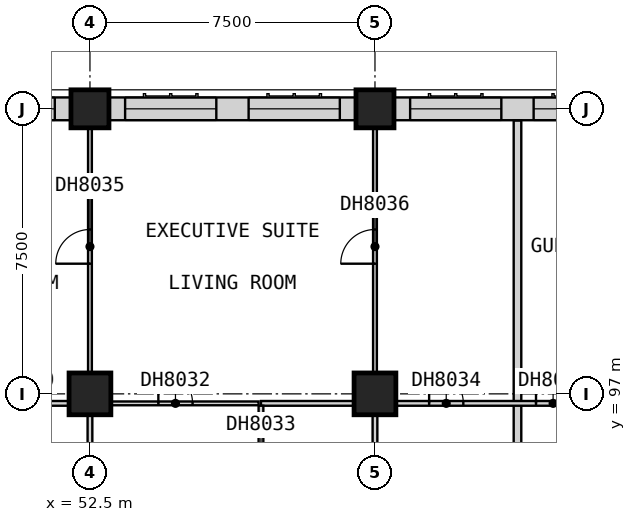
"""IFC4 building model, lengths in metres.
Left out: names, types, materials, properties, quantities, classifications, styles, units other than length and angle.
Written with IfcOpenShell. Run it as: python <this file> out.ifc"""

import sys

from ifc_helpers import new_model, si_unit, direction, frame, frame_2d, origin, origin_2d, place, context, subcontext, project, spatial, rectangle, extrude, element, fill, save


model = new_model("IFC4")
c1 = context("Model", 3, precision=1e-05, world=origin(), true_north=direction((0.0, 1.0)))
c2 = subcontext(c1, "Body", "Model", "MODEL_VIEW")
j1 = project(units=[si_unit("LENGTHUNIT", "METRE"), si_unit("PLANEANGLEUNIT", "RADIAN")], contexts=[c1])
p1 = place(None, origin())
s1 = spatial("IfcSite", under=j1, at=p1, CompositionType="ELEMENT")
p2 = place(p1, origin())
s2 = spatial("IfcBuilding", under=s1, at=p2, CompositionType="ELEMENT")
p3 = place(p2, frame((0.0, 0.0, 89.9)))
s3 = spatial("IfcBuildingStorey", under=s2, at=p3, CompositionType="ELEMENT", Elevation=89.9)
p4 = place(p3, frame((52.5, 97.0, 0.0), z_axis=(0.0, 0.0, 1.0), x_axis=(1.0, 0.0, 0.0)))
e1 = element("IfcColumn", 1, at=p4, inside=s3, PredefinedType="COLUMN", context=c2, shape_type="SweptSolid", body=[
    extrude(rectangle(XDim=1.1, YDim=1.1, at=origin_2d()), origin(), (0.0, 0.0, 1.0), 3.6),
])
p5 = place(p3, frame((52.5, 104.5, 0.0), z_axis=(0.0, 0.0, 1.0), x_axis=(1.0, 0.0, 0.0)))
e2 = element("IfcColumn", 2, at=p5, inside=s3, PredefinedType="COLUMN", context=c2, shape_type="SweptSolid", body=[
    extrude(rectangle(XDim=1.0, YDim=1.0, at=origin_2d()), origin(), (0.0, 0.0, 1.0), 3.6),
])
p6 = place(p3, frame((60.0, 97.0, 0.0), z_axis=(0.0, 0.0, 1.0), x_axis=(1.0, 0.0, 0.0)))
e3 = element("IfcColumn", 3, at=p6, inside=s3, PredefinedType="COLUMN", context=c2, shape_type="SweptSolid", body=[
    extrude(rectangle(XDim=1.1, YDim=1.1, at=origin_2d()), origin(), (0.0, 0.0, 1.0), 3.6),
])
p7 = place(p3, frame((60.0, 104.5, 0.0), z_axis=(0.0, 0.0, 1.0), x_axis=(1.0, 0.0, 0.0)))
e4 = element("IfcColumn", 4, at=p7, inside=s3, PredefinedType="COLUMN", context=c2, shape_type="SweptSolid", body=[
    extrude(rectangle(XDim=1.0, YDim=1.0, at=origin_2d()), origin(), (0.0, 0.0, 1.0), 3.6),
])
p8 = place(p3, frame((67.0, 104.5, 0.0), z_axis=(0.0, 0.0, 1.0), x_axis=(-1.0, 0.0, 0.0)))
e5 = element("IfcWall", 5, at=p8, inside=s3, PredefinedType="SOLIDWALL", context=c2, shape_type="SweptSolid", body=[
    extrude(rectangle(XDim=6.5, YDim=0.6, at=frame_2d((3.25, 0.0))), origin(), (0.0, 0.0, 1.0), 2.85),
])
p9 = place(p8, frame((3.675, 0.0, 0.8)))
e6 = element("IfcOpeningElement", 6, at=p9, cuts=e5, PredefinedType="OPENING", context=c2, shape_type="SweptSolid", body=[
    extrude(rectangle(XDim=2.4, YDim=1.8, at=frame_2d((1.2, 0.9))), frame((0.0, 0.31, 0.0), z_axis=(0.0, -1.0, 0.0), x_axis=(1.0, 0.0, 0.0)), (0.0, 0.0, 1.0), 0.62),
])
p10 = place(p8, frame((0.425, 0.0, 0.8)))
e7 = element("IfcOpeningElement", 7, at=p10, cuts=e5, PredefinedType="OPENING", context=c2, shape_type="SweptSolid", body=[
    extrude(rectangle(XDim=2.4, YDim=1.8, at=frame_2d((1.2, 0.9))), frame((0.0, 0.31, 0.0), z_axis=(0.0, -1.0, 0.0), x_axis=(1.0, 0.0, 0.0)), (0.0, 0.0, 1.0), 0.62),
])
p11 = place(p3, frame((59.5, 104.5, 0.0), z_axis=(0.0, 0.0, 1.0), x_axis=(-1.0, 0.0, 0.0)))
e8 = element("IfcWall", 8, at=p11, inside=s3, PredefinedType="SOLIDWALL", context=c2, shape_type="SweptSolid", body=[
    extrude(rectangle(XDim=6.5, YDim=0.6, at=frame_2d((3.25, 0.0))), origin(), (0.0, 0.0, 1.0), 2.85),
])
p12 = place(p11, frame((3.675, 0.0, 0.8)))
e9 = element("IfcOpeningElement", 9, at=p12, cuts=e8, PredefinedType="OPENING", context=c2, shape_type="SweptSolid", body=[
    extrude(rectangle(XDim=2.4, YDim=1.8, at=frame_2d((1.2, 0.9))), frame((0.0, 0.31, 0.0), z_axis=(0.0, -1.0, 0.0), x_axis=(1.0, 0.0, 0.0)), (0.0, 0.0, 1.0), 0.62),
])
p13 = place(p11, frame((0.425, 0.0, 0.8)))
e10 = element("IfcOpeningElement", 10, at=p13, cuts=e8, PredefinedType="OPENING", context=c2, shape_type="SweptSolid", body=[
    extrude(rectangle(XDim=2.4, YDim=1.8, at=frame_2d((1.2, 0.9))), frame((0.0, 0.31, 0.0), z_axis=(0.0, -1.0, 0.0), x_axis=(1.0, 0.0, 0.0)), (0.0, 0.0, 1.0), 0.62),
])
p14 = place(p3, frame((52.0, 104.5, 0.0), z_axis=(0.0, 0.0, 1.0), x_axis=(-1.0, 0.0, 0.0)))
e11 = element("IfcWall", 11, at=p14, inside=s3, PredefinedType="SOLIDWALL", context=c2, shape_type="SweptSolid", body=[
    extrude(rectangle(XDim=6.5, YDim=0.6, at=frame_2d((3.25, 0.0))), origin(), (0.0, 0.0, 1.0), 2.85),
])
p15 = place(p14, frame((3.675, 0.0, 0.8)))
e12 = element("IfcOpeningElement", 12, at=p15, cuts=e11, PredefinedType="OPENING", context=c2, shape_type="SweptSolid", body=[
    extrude(rectangle(XDim=2.4, YDim=1.8, at=frame_2d((1.2, 0.9))), frame((0.0, 0.31, 0.0), z_axis=(0.0, -1.0, 0.0), x_axis=(1.0, 0.0, 0.0)), (0.0, 0.0, 1.0), 0.62),
])
p16 = place(p14, frame((0.425, 0.0, 0.8)))
e13 = element("IfcOpeningElement", 13, at=p16, cuts=e11, PredefinedType="OPENING", context=c2, shape_type="SweptSolid", body=[
    extrude(rectangle(XDim=2.4, YDim=1.8, at=frame_2d((1.2, 0.9))), frame((0.0, 0.31, 0.0), z_axis=(0.0, -1.0, 0.0), x_axis=(1.0, 0.0, 0.0)), (0.0, 0.0, 1.0), 0.62),
])
p17 = place(p3, frame((63.75, 92.475, 0.0), z_axis=(0.0, 0.0, 1.0), x_axis=(0.0, 1.0, 0.0)))
e14 = element("IfcWall", 14, at=p17, inside=s3, PredefinedType="PARTITIONING", context=c2, shape_type="SweptSolid", body=[
    extrude(rectangle(XDim=11.715, YDim=0.2, at=frame_2d((5.857, 0.0))), origin(), (0.0, 0.0, 1.0), 3.35),
])
p18 = place(p3, frame((52.562, 96.75, 0.0), z_axis=(0.0, 0.0, 1.0), x_axis=(1.0, 0.0, 0.0)))
e15 = element("IfcWall", 15, at=p18, inside=s3, PredefinedType="PARTITIONING", context=c2, shape_type="SweptSolid", body=[
    extrude(rectangle(XDim=4.375, YDim=0.1, at=frame_2d((2.188, 0.0))), origin(), (0.0, 0.0, 1.0), 3.35),
])
p19 = place(p18, frame((1.738, 0.0, 0.0)))
e16 = element("IfcOpeningElement", 16, at=p19, cuts=e15, PredefinedType="OPENING", context=c2, shape_type="SweptSolid", body=[
    extrude(rectangle(XDim=0.9, YDim=2.1, at=frame_2d((0.45, 1.05))), frame((0.0, 0.06, 0.0), z_axis=(0.0, -1.0, 0.0), x_axis=(1.0, 0.0, 0.0)), (0.0, 0.0, 1.0), 0.12),
])
p20 = place(p3, frame((52.5, 96.812, 0.0), z_axis=(0.0, 0.0, 1.0), x_axis=(0.0, 1.0, 0.0)))
e17 = element("IfcWall", 17, at=p20, inside=s3, PredefinedType="PARTITIONING", context=c2, shape_type="SweptSolid", body=[
    extrude(rectangle(XDim=8.188, YDim=0.1, at=frame_2d((4.094, 0.0))), origin(), (0.0, 0.0, 1.0), 3.35),
])
p21 = place(p20, frame((3.613, 0.0, 0.0)))
e18 = element("IfcOpeningElement", 18, at=p21, cuts=e17, PredefinedType="OPENING", context=c2, shape_type="SweptSolid", body=[
    extrude(rectangle(XDim=0.9, YDim=2.1, at=frame_2d((0.45, 1.05))), frame((0.0, 0.06, 0.0), z_axis=(0.0, -1.0, 0.0), x_axis=(1.0, 0.0, 0.0)), (0.0, 0.0, 1.0), 0.12),
])
p22 = place(p3, frame((60.0, 96.812, 0.0), z_axis=(0.0, 0.0, 1.0), x_axis=(0.0, 1.0, 0.0)))
e19 = element("IfcWall", 19, at=p22, inside=s3, PredefinedType="PARTITIONING", context=c2, shape_type="SweptSolid", body=[
    extrude(rectangle(XDim=8.188, YDim=0.1, at=frame_2d((4.094, 0.0))), origin(), (0.0, 0.0, 1.0), 3.35),
])
p23 = place(p22, frame((3.613, 0.0, 0.0)))
e20 = element("IfcOpeningElement", 20, at=p23, cuts=e19, PredefinedType="OPENING", context=c2, shape_type="SweptSolid", body=[
    extrude(rectangle(XDim=0.9, YDim=2.1, at=frame_2d((0.45, 1.05))), frame((0.0, 0.06, 0.0), z_axis=(0.0, -1.0, 0.0), x_axis=(1.0, 0.0, 0.0)), (0.0, 0.0, 1.0), 0.12),
])
p24 = place(p3, frame((48.85, 96.75, 0.0), z_axis=(0.0, 0.0, 1.0), x_axis=(1.0, 0.0, 0.0)))
e21 = element("IfcWall", 21, at=p24, inside=s3, PredefinedType="PARTITIONING", context=c2, shape_type="SweptSolid", body=[
    extrude(rectangle(XDim=3.65, YDim=0.125, at=frame_2d((1.825, 0.0))), origin(), (0.0, 0.0, 1.0), 3.35),
])
p25 = place(p24, frame((1.325, 0.0, 0.0)))
e22 = element("IfcOpeningElement", 22, at=p25, cuts=e21, PredefinedType="OPENING", context=c2, shape_type="SweptSolid", body=[
    extrude(rectangle(XDim=0.9, YDim=2.1, at=frame_2d((0.45, 1.05))), frame((0.0, 0.073, 0.0), z_axis=(0.0, -1.0, 0.0), x_axis=(1.0, 0.0, 0.0)), (0.0, 0.0, 1.0), 0.145),
])
p26 = place(p3, frame((57.0, 96.75, 0.0), z_axis=(0.0, 0.0, 1.0), x_axis=(1.0, 0.0, 0.0)))
e23 = element("IfcWall", 23, at=p26, inside=s3, PredefinedType="PARTITIONING", context=c2, shape_type="SweptSolid", body=[
    extrude(rectangle(XDim=8.625, YDim=0.125, at=frame_2d((4.312, 0.0))), origin(), (0.0, 0.0, 1.0), 3.35),
])
p27 = place(p26, frame((4.425, 0.0, 0.0)))
e24 = element("IfcOpeningElement", 24, at=p27, cuts=e23, PredefinedType="OPENING", context=c2, shape_type="SweptSolid", body=[
    extrude(rectangle(XDim=0.9, YDim=2.1, at=frame_2d((0.45, 1.05))), frame((0.0, 0.073, 0.0), z_axis=(0.0, -1.0, 0.0), x_axis=(1.0, 0.0, 0.0)), (0.0, 0.0, 1.0), 0.145),
])
p28 = place(p26, frame((7.238, 0.0, 0.0)))
e25 = element("IfcOpeningElement", 25, at=p28, cuts=e23, PredefinedType="OPENING", context=c2, shape_type="SweptSolid", body=[
    extrude(rectangle(XDim=0.9, YDim=2.1, at=frame_2d((0.45, 1.05))), frame((0.0, 0.073, 0.0), z_axis=(0.0, -1.0, 0.0), x_axis=(1.0, 0.0, 0.0)), (0.0, 0.0, 1.0), 0.145),
])
p29 = place(p3, frame((52.5, 92.475, 0.0), z_axis=(0.0, 0.0, 1.0), x_axis=(0.0, 1.0, 0.0)))
e26 = element("IfcWall", 26, at=p29, inside=s3, PredefinedType="PARTITIONING", context=c2, shape_type="SweptSolid", body=[
    extrude(rectangle(XDim=4.212, YDim=0.125, at=frame_2d((2.106, 0.0))), origin(), (0.0, 0.0, 1.0), 3.35),
])
p30 = place(p3, frame((57.0, 92.475, 0.0), z_axis=(0.0, 0.0, 1.0), x_axis=(0.0, 1.0, 0.0)))
e27 = element("IfcWall", 27, at=p30, inside=s3, PredefinedType="PARTITIONING", context=c2, shape_type="SweptSolid", body=[
    extrude(rectangle(XDim=4.212, YDim=0.125, at=frame_2d((2.106, 0.0))), origin(), (0.0, 0.0, 1.0), 3.35),
])
p31 = place(p30, frame((1.65, 0.0, 0.0)))
e28 = element("IfcOpeningElement", 28, at=p31, cuts=e27, PredefinedType="OPENING", context=c2, shape_type="SweptSolid", body=[
    extrude(rectangle(XDim=0.9, YDim=2.1, at=frame_2d((0.45, 1.05))), frame((0.0, 0.073, 0.0), z_axis=(0.0, -1.0, 0.0), x_axis=(1.0, 0.0, 0.0)), (0.0, 0.0, 1.0), 0.145),
])
p32 = place(p3, frame((60.0, 92.475, 0.0), z_axis=(0.0, 0.0, 1.0), x_axis=(0.0, 1.0, 0.0)))
e29 = element("IfcWall", 29, at=p32, inside=s3, PredefinedType="PARTITIONING", context=c2, shape_type="SweptSolid", body=[
    extrude(rectangle(XDim=4.212, YDim=0.125, at=frame_2d((2.106, 0.0))), origin(), (0.0, 0.0, 1.0), 3.35),
])
p33 = place(p9, origin())
e30 = element("IfcWindow", 30, at=p33, inside=s3, PartitioningType="SINGLE_PANEL", PredefinedType="WINDOW", context=c2, shape_type="SweptSolid", body=[
    extrude(rectangle(XDim=2.4, YDim=1.8, at=frame_2d((1.2, 0.9))), frame((0.0, -0.07, 0.0), z_axis=(0.0, -1.0, 0.0), x_axis=(1.0, 0.0, 0.0)), (0.0, 0.0, 1.0), 0.06),
])
fill(e6, e30)
p34 = place(p10, origin())
e31 = element("IfcWindow", 31, at=p34, inside=s3, PartitioningType="SINGLE_PANEL", PredefinedType="WINDOW", context=c2, shape_type="SweptSolid", body=[
    extrude(rectangle(XDim=2.4, YDim=1.8, at=frame_2d((1.2, 0.9))), frame((0.0, -0.07, 0.0), z_axis=(0.0, -1.0, 0.0), x_axis=(1.0, 0.0, 0.0)), (0.0, 0.0, 1.0), 0.06),
])
fill(e7, e31)
p35 = place(p12, origin())
e32 = element("IfcWindow", 32, at=p35, inside=s3, PartitioningType="SINGLE_PANEL", PredefinedType="WINDOW", context=c2, shape_type="SweptSolid", body=[
    extrude(rectangle(XDim=2.4, YDim=1.8, at=frame_2d((1.2, 0.9))), frame((0.0, -0.07, 0.0), z_axis=(0.0, -1.0, 0.0), x_axis=(1.0, 0.0, 0.0)), (0.0, 0.0, 1.0), 0.06),
])
fill(e9, e32)
p36 = place(p13, origin())
e33 = element("IfcWindow", 33, at=p36, inside=s3, PartitioningType="SINGLE_PANEL", PredefinedType="WINDOW", context=c2, shape_type="SweptSolid", body=[
    extrude(rectangle(XDim=2.4, YDim=1.8, at=frame_2d((1.2, 0.9))), frame((0.0, -0.07, 0.0), z_axis=(0.0, -1.0, 0.0), x_axis=(1.0, 0.0, 0.0)), (0.0, 0.0, 1.0), 0.06),
])
fill(e10, e33)
p37 = place(p16, origin())
e34 = element("IfcWindow", 34, at=p37, inside=s3, PartitioningType="SINGLE_PANEL", PredefinedType="WINDOW", context=c2, shape_type="SweptSolid", body=[
    extrude(rectangle(XDim=2.4, YDim=1.8, at=frame_2d((1.2, 0.9))), frame((0.0, -0.07, 0.0), z_axis=(0.0, -1.0, 0.0), x_axis=(1.0, 0.0, 0.0)), (0.0, 0.0, 1.0), 0.06),
])
fill(e13, e34)
p38 = place(p19, origin())
e35 = element("IfcDoor", 35, at=p38, inside=s3, OperationType="SINGLE_SWING_RIGHT", PredefinedType="DOOR", context=c2, shape_type="SweptSolid", body=[
    extrude(rectangle(XDim=0.9, YDim=2.1, at=frame_2d((0.45, 1.05))), frame((0.0, 0.025, 0.0), z_axis=(0.0, -1.0, 0.0), x_axis=(1.0, 0.0, 0.0)), (0.0, 0.0, 1.0), 0.05),
])
fill(e16, e35)
p39 = place(p27, origin())
e36 = element("IfcDoor", 36, at=p39, inside=s3, OperationType="SINGLE_SWING_RIGHT", PredefinedType="DOOR", context=c2, shape_type="SweptSolid", body=[
    extrude(rectangle(XDim=0.9, YDim=2.1, at=frame_2d((0.45, 1.05))), frame((0.0, 0.025, 0.0), z_axis=(0.0, -1.0, 0.0), x_axis=(1.0, 0.0, 0.0)), (0.0, 0.0, 1.0), 0.05),
])
fill(e24, e36)
p40 = place(p21, origin())
e37 = element("IfcDoor", 37, at=p40, inside=s3, OperationType="SINGLE_SWING_LEFT", PredefinedType="DOOR", context=c2, shape_type="SweptSolid", body=[
    extrude(rectangle(XDim=0.9, YDim=2.1, at=frame_2d((0.45, 1.05))), frame((0.0, 0.025, 0.0), z_axis=(0.0, -1.0, 0.0), x_axis=(1.0, 0.0, 0.0)), (0.0, 0.0, 1.0), 0.05),
])
fill(e18, e37)
p41 = place(p23, origin())
e38 = element("IfcDoor", 38, at=p41, inside=s3, OperationType="SINGLE_SWING_LEFT", PredefinedType="DOOR", context=c2, shape_type="SweptSolid", body=[
    extrude(rectangle(XDim=0.9, YDim=2.1, at=frame_2d((0.45, 1.05))), frame((0.0, 0.025, 0.0), z_axis=(0.0, -1.0, 0.0), x_axis=(1.0, 0.0, 0.0)), (0.0, 0.0, 1.0), 0.05),
])
fill(e20, e38)
p42 = place(p28, origin())
e39 = element("IfcDoor", 39, at=p42, inside=s3, OperationType="SINGLE_SWING_RIGHT", PredefinedType="DOOR", context=c2, shape_type="SweptSolid", body=[
    extrude(rectangle(XDim=0.9, YDim=2.1, at=frame_2d((0.45, 1.05))), frame((0.0, 0.025, 0.0), z_axis=(0.0, -1.0, 0.0), x_axis=(1.0, 0.0, 0.0)), (0.0, 0.0, 1.0), 0.05),
])
fill(e25, e39)
save(model, sys.argv[1])
